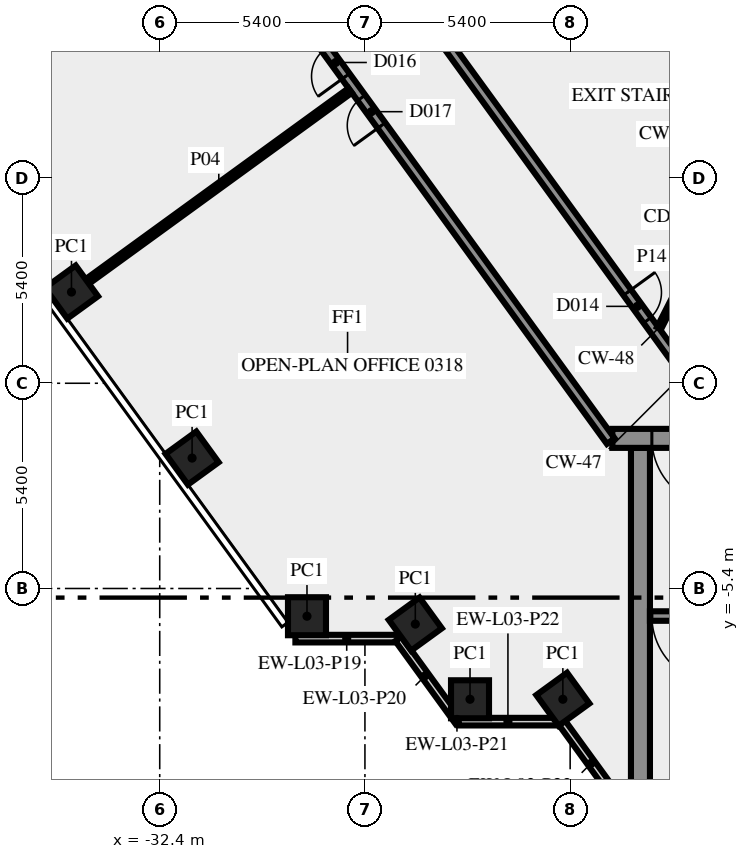
"""IFC4 building model, lengths in metres.
Left out: names, types, materials, properties, quantities, classifications, styles, units other than length and angle.
Written with IfcOpenShell. Run it as: python <this file> out.ifc"""

import sys

from ifc_helpers import new_model, si_unit, direction, frame, frame_2d, origin, origin_2d, place, context, subcontext, project, spatial, rectangle, extrude, element, fill, save


model = new_model("IFC4")
c1 = context("Model", 3, precision=1e-05, world=origin(), true_north=direction((0.0, 1.0)))
c2 = subcontext(c1, "Body", "Model", "MODEL_VIEW")
j1 = project(units=[si_unit("LENGTHUNIT", "METRE"), si_unit("PLANEANGLEUNIT", "RADIAN")], contexts=[c1])
p1 = place(None, origin())
s1 = spatial("IfcSite", under=j1, at=p1, CompositionType="ELEMENT")
p2 = place(p1, origin())
s2 = spatial("IfcBuilding", under=s1, at=p2, CompositionType="ELEMENT")
p3 = place(p2, frame((0.0, 0.0, 16.0)))
s3 = spatial("IfcBuildingStorey", under=s2, at=p3, CompositionType="ELEMENT", Elevation=16.0)
for number, where, z_axis, x_axis in (
    (1, (-34.722, 2.4, 0.0), (0.0, 0.0, 1.0), (0.588, -0.809, 0.0)),
    (2, (-31.548, -1.969, 0.0), (0.0, 0.0, 1.0), (0.588, -0.809, 0.0)),
    (3, (-28.525, -6.13, 0.0), (0.0, 0.0, 1.0), (1.0, 0.0, 0.0)),
    (4, (-25.674, -6.337, 0.0), (0.0, 0.0, 1.0), (0.588, -0.809, 0.0)),
    (5, (-24.235, -8.315, 0.0), (0.0, 0.0, 1.0), (1.0, 0.0, 0.0)),
    (6, (-21.792, -8.315, 0.0), (0.0, 0.0, 1.0), (0.588, -0.809, 0.0)),
):
    element("IfcColumn", number, at=place(p3, frame(where, z_axis=z_axis, x_axis=x_axis)), inside=s3, PredefinedType="COLUMN", context=c2, shape_type="SweptSolid", body=[
        extrude(rectangle(XDim=1.0, YDim=1.0, at=origin_2d()), origin(), (0.0, 0.0, 1.0), 4.1),
    ])
p4 = place(p3, frame((-28.83, -6.719, 0.0), z_axis=(0.0, 0.0, 1.0), x_axis=(1.0, 0.0, 0.0)))
e7 = element("IfcWall", 7, at=p4, inside=s3, PredefinedType="SOLIDWALL", context=c2, shape_type="SweptSolid", body=[
    extrude(rectangle(XDim=2.7, YDim=0.2, at=frame_2d((1.35, 0.0))), origin(), (0.0, 0.0, 1.0), 4.1),
])
p5 = place(p3, frame((-26.12, -6.724, 0.0), z_axis=(0.0, 0.0, 1.0), x_axis=(0.587706476352, -0.809074222587, 0.0)))
e8 = element("IfcWall", 8, at=p5, inside=s3, PredefinedType="SOLIDWALL", context=c2, shape_type="SweptSolid", body=[
    extrude(rectangle(XDim=2.403, YDim=0.2, at=frame_2d((1.202, 0.0))), origin(), (0.0, 0.0, 1.0), 4.1),
])
p6 = place(p3, frame((-24.624, -8.784, 0.0), z_axis=(0.0, 0.0, 1.0), x_axis=(0.586760218966, -0.809760733451, 0.0)))
e9 = element("IfcWall", 9, at=p6, inside=s3, PredefinedType="SOLIDWALL", context=c2, shape_type="SweptSolid", body=[
    extrude(rectangle(XDim=0.154, YDim=0.2, at=frame_2d((0.077, 0.0))), origin(), (0.0, 0.0, 1.0), 4.1),
])
p7 = place(p3, frame((-24.531, -8.904, 0.0), z_axis=(0.0, 0.0, 1.0), x_axis=(1.0, 0.0, 0.0)))
e10 = element("IfcWall", 10, at=p7, inside=s3, PredefinedType="SOLIDWALL", context=c2, shape_type="SweptSolid", body=[
    extrude(rectangle(XDim=2.587, YDim=0.2, at=frame_2d((1.294, 0.0))), origin(), (0.0, 0.0, 1.0), 4.1),
])
p8 = place(p3, frame((-21.833, -8.909, 0.0), z_axis=(0.0, 0.0, 1.0), x_axis=(0.587766567315, -0.809030569476, 0.0)))
e11 = element("IfcWall", 11, at=p8, inside=s3, PredefinedType="SOLIDWALL", context=c2, shape_type="SweptSolid", body=[
    extrude(rectangle(XDim=2.688, YDim=0.2, at=frame_2d((1.344, 0.0))), origin(), (0.0, 0.0, 1.0), 4.1),
])
p9 = place(p3, frame((-19.75, -10.5, 0.0), z_axis=(0.0, 0.0, 1.0), x_axis=(0.0, 1.0, 0.0)))
e12 = element("IfcWall", 12, at=p9, inside=s3, PredefinedType="SHEAR", context=c2, shape_type="SweptSolid", body=[
    extrude(rectangle(XDim=8.8, YDim=0.5, at=frame_2d((4.4, 0.0))), origin(), (0.0, 0.0, 1.0), 4.1),
])
p10 = place(p3, frame((-11.45, -6.125, 0.0), z_axis=(0.0, 0.0, 1.0), x_axis=(-1.0, 0.0, 0.0)))
e13 = element("IfcWall", 13, at=p10, inside=s3, PredefinedType="SHEAR", context=c2, shape_type="SweptSolid", body=[
    extrude(rectangle(XDim=8.05, YDim=0.25, at=frame_2d((4.025, 0.0))), origin(), (0.0, 0.0, 1.0), 4.1),
])
p11 = place(p10, frame((6.2, 0.0, 0.0)))
e14 = element("IfcOpeningElement", 14, at=p11, cuts=e13, PredefinedType="OPENING", context=c2, shape_type="SweptSolid", body=[
    extrude(rectangle(XDim=1.8, YDim=2.1, at=frame_2d((0.9, 1.05))), frame((0.0, 0.135, 0.0), z_axis=(0.0, -1.0, 0.0), x_axis=(1.0, 0.0, 0.0)), (0.0, 0.0, 1.0), 0.27),
])
p12 = place(p3, frame((20.49, -1.45, 0.0), z_axis=(0.0, 0.0, 1.0), x_axis=(-1.0, 0.0, 0.0)))
e15 = element("IfcWall", 15, at=p12, inside=s3, PredefinedType="SHEAR", context=c2, shape_type="SweptSolid", body=[
    extrude(rectangle(XDim=40.98, YDim=0.5, at=frame_2d((20.49, 0.0))), origin(), (0.0, 0.0, 1.0), 4.1),
])
p13 = place(p12, frame((38.14, 0.0, 0.0)))
e16 = element("IfcOpeningElement", 16, at=p13, cuts=e15, PredefinedType="OPENING", context=c2, shape_type="SweptSolid", body=[
    extrude(rectangle(XDim=1.8, YDim=2.1, at=frame_2d((0.9, 1.05))), frame((0.0, 0.26, 0.0), z_axis=(0.0, -1.0, 0.0), x_axis=(1.0, 0.0, 0.0)), (0.0, 0.0, 1.0), 0.52),
])
p14 = place(p12, frame((36.728, 0.0, 0.0)))
e17 = element("IfcOpeningElement", 17, at=p14, cuts=e15, PredefinedType="OPENING", context=c2, shape_type="SweptSolid", body=[
    extrude(rectangle(XDim=0.8, YDim=2.1, at=frame_2d((0.4, 1.05))), frame((0.0, 0.26, 0.0), z_axis=(0.0, -1.0, 0.0), x_axis=(1.0, 0.0, 0.0)), (0.0, 0.0, 1.0), 0.52),
])
p15 = place(p12, frame((35.153, 0.0, 0.0)))
e18 = element("IfcOpeningElement", 18, at=p15, cuts=e15, PredefinedType="OPENING", context=c2, shape_type="SweptSolid", body=[
    extrude(rectangle(XDim=0.8, YDim=2.1, at=frame_2d((0.4, 1.05))), frame((0.0, 0.26, 0.0), z_axis=(0.0, -1.0, 0.0), x_axis=(1.0, 0.0, 0.0)), (0.0, 0.0, 1.0), 0.52),
])
p16 = place(p12, frame((32.94, 0.0, 0.0)))
e19 = element("IfcOpeningElement", 19, at=p16, cuts=e15, PredefinedType="OPENING", context=c2, shape_type="SweptSolid", body=[
    extrude(rectangle(XDim=0.9, YDim=2.1, at=frame_2d((0.45, 1.05))), frame((0.0, 0.26, 0.0), z_axis=(0.0, -1.0, 0.0), x_axis=(1.0, 0.0, 0.0)), (0.0, 0.0, 1.0), 0.52),
])
p17 = place(p12, frame((21.765, 0.0, 0.0)))
e20 = element("IfcOpeningElement", 20, at=p17, cuts=e15, PredefinedType="OPENING", context=c2, shape_type="SweptSolid", body=[
    extrude(rectangle(XDim=2.0, YDim=2.1, at=frame_2d((1.0, 1.05))), frame((0.0, 0.26, 0.0), z_axis=(0.0, -1.0, 0.0), x_axis=(1.0, 0.0, 0.0)), (0.0, 0.0, 1.0), 0.52),
])
p18 = place(p12, frame((7.14, 0.0, 0.0)))
e21 = element("IfcOpeningElement", 21, at=p18, cuts=e15, PredefinedType="OPENING", context=c2, shape_type="SweptSolid", body=[
    extrude(rectangle(XDim=0.9, YDim=2.1, at=frame_2d((0.45, 1.05))), frame((0.0, 0.26, 0.0), z_axis=(0.0, -1.0, 0.0), x_axis=(1.0, 0.0, 0.0)), (0.0, 0.0, 1.0), 0.52),
])
p19 = place(p12, frame((4.19, 0.0, 0.0)))
e22 = element("IfcOpeningElement", 22, at=p19, cuts=e15, PredefinedType="OPENING", context=c2, shape_type="SweptSolid", body=[
    extrude(rectangle(XDim=0.9, YDim=2.1, at=frame_2d((0.45, 1.05))), frame((0.0, 0.26, 0.0), z_axis=(0.0, -1.0, 0.0), x_axis=(1.0, 0.0, 0.0)), (0.0, 0.0, 1.0), 0.52),
])
p20 = place(p12, frame((1.04, 0.0, 0.0)))
e23 = element("IfcOpeningElement", 23, at=p20, cuts=e15, PredefinedType="OPENING", context=c2, shape_type="SweptSolid", body=[
    extrude(rectangle(XDim=1.8, YDim=2.1, at=frame_2d((0.9, 1.05))), frame((0.0, 0.26, 0.0), z_axis=(0.0, -1.0, 0.0), x_axis=(1.0, 0.0, 0.0)), (0.0, 0.0, 1.0), 0.52),
])
p21 = place(p3, frame((-20.531, -1.523, 0.0), z_axis=(0.0, 0.0, 1.0), x_axis=(-0.587784522481, 0.809017524614, 0.0)))
e24 = element("IfcWall", 24, at=p21, inside=s3, PredefinedType="SOLIDWALL", context=c2, shape_type="SweptSolid", body=[
    extrude(rectangle(XDim=49.912, YDim=0.25, at=frame_2d((24.956, 0.0))), origin(), (0.0, 0.0, 1.0), 4.1),
])
p22 = place(p21, frame((10.266, 0.0, 0.0)))
e25 = element("IfcOpeningElement", 25, at=p22, cuts=e24, PredefinedType="OPENING", context=c2, shape_type="SweptSolid", body=[
    extrude(rectangle(XDim=0.9, YDim=2.1, at=frame_2d((0.45, 1.05))), frame((0.0, 0.135, 0.0), z_axis=(0.0, -1.0, 0.0), x_axis=(1.0, 0.0, 0.0)), (0.0, 0.0, 1.0), 0.27),
])
p23 = place(p21, frame((37.193, 0.0, 0.0)))
e26 = element("IfcOpeningElement", 26, at=p23, cuts=e24, PredefinedType="OPENING", context=c2, shape_type="SweptSolid", body=[
    extrude(rectangle(XDim=1.8, YDim=2.1, at=frame_2d((0.9, 1.05))), frame((0.0, 0.135, 0.0), z_axis=(0.0, -1.0, 0.0), x_axis=(1.0, 0.0, 0.0)), (0.0, 0.0, 1.0), 0.27),
])
p24 = place(p21, frame((11.866, 0.0, 0.0)))
e27 = element("IfcOpeningElement", 27, at=p24, cuts=e24, PredefinedType="OPENING", context=c2, shape_type="SweptSolid", body=[
    extrude(rectangle(XDim=0.9, YDim=2.1, at=frame_2d((0.45, 1.05))), frame((0.0, 0.135, 0.0), z_axis=(0.0, -1.0, 0.0), x_axis=(1.0, 0.0, 0.0)), (0.0, 0.0, 1.0), 0.27),
])
p25 = place(p3, frame((-37.232, 25.972, 0.0), z_axis=(0.0, 0.0, 1.0), x_axis=(0.587786323093, -0.809016216391, 0.0)))
e28 = element("IfcWall", 28, at=p25, inside=s3, PredefinedType="SOLIDWALL", context=c2, shape_type="SweptSolid", body=[
    extrude(rectangle(XDim=33.493, YDim=0.25, at=frame_2d((16.747, 0.0))), origin(), (0.0, 0.0, 1.0), 4.1),
])
p26 = place(p25, frame((29.152, 0.0, 0.0)))
e29 = element("IfcOpeningElement", 29, at=p26, cuts=e28, PredefinedType="OPENING", context=c2, shape_type="SweptSolid", body=[
    extrude(rectangle(XDim=0.9, YDim=2.1, at=frame_2d((0.45, 1.05))), frame((0.0, 0.135, 0.0), z_axis=(0.0, -1.0, 0.0), x_axis=(1.0, 0.0, 0.0)), (0.0, 0.0, 1.0), 0.27),
])
p27 = place(p25, frame((5.113, 0.0, 0.0)))
e30 = element("IfcOpeningElement", 30, at=p27, cuts=e28, PredefinedType="OPENING", context=c2, shape_type="SweptSolid", body=[
    extrude(rectangle(XDim=1.8, YDim=2.1, at=frame_2d((0.9, 1.05))), frame((0.0, 0.135, 0.0), z_axis=(0.0, -1.0, 0.0), x_axis=(1.0, 0.0, 0.0)), (0.0, 0.0, 1.0), 0.27),
])
p28 = place(p3, frame((-27.389, 7.703, 0.0), z_axis=(0.0, 0.0, 1.0), x_axis=(-0.809054740315, -0.587733295955, 0.0)))
e31 = element("IfcWall", 31, at=p28, inside=s3, PredefinedType="PARTITIONING", context=c2, shape_type="SweptSolid", body=[
    extrude(rectangle(XDim=8.545, YDim=0.15, at=frame_2d((4.272, 0.0))), origin(), (0.0, 0.0, 1.0), 4.1),
])
p29 = place(p3, frame((-19.261, 1.45, 0.0), z_axis=(0.0, 0.0, 1.0), x_axis=(0.453950796792, 0.891026752736, 0.0)))
e32 = element("IfcWall", 32, at=p29, inside=s3, PredefinedType="PARTITIONING", context=c2, shape_type="SweptSolid", body=[
    extrude(rectangle(XDim=2.778, YDim=0.12, at=frame_2d((1.389, 0.0))), origin(), (0.0, 0.0, 1.0), 4.1),
])
p30 = place(p11, origin())
e33 = element("IfcDoor", 33, at=p30, inside=s3, OperationType="DOUBLE_DOOR_SINGLE_SWING", PredefinedType="DOOR", context=c2, shape_type="SweptSolid", body=[
    extrude(rectangle(XDim=1.8, YDim=2.1, at=frame_2d((0.9, 1.05))), frame((0.0, 0.025, 0.0), z_axis=(0.0, -1.0, 0.0), x_axis=(1.0, 0.0, 0.0)), (0.0, 0.0, 1.0), 0.05),
])
fill(e14, e33)
p31 = place(p13, origin())
e34 = element("IfcDoor", 34, at=p31, inside=s3, OperationType="DOUBLE_DOOR_SINGLE_SWING", PredefinedType="DOOR", context=c2, shape_type="SweptSolid", body=[
    extrude(rectangle(XDim=1.8, YDim=2.1, at=frame_2d((0.9, 1.05))), frame((0.0, 0.025, 0.0), z_axis=(0.0, -1.0, 0.0), x_axis=(1.0, 0.0, 0.0)), (0.0, 0.0, 1.0), 0.05),
])
fill(e16, e34)
p32 = place(p22, origin())
e35 = element("IfcDoor", 35, at=p32, inside=s3, OperationType="SINGLE_SWING_RIGHT", PredefinedType="DOOR", context=c2, shape_type="SweptSolid", body=[
    extrude(rectangle(XDim=0.9, YDim=2.1, at=frame_2d((0.45, 1.05))), frame((0.0, 0.025, 0.0), z_axis=(0.0, -1.0, 0.0), x_axis=(1.0, 0.0, 0.0)), (0.0, 0.0, 1.0), 0.05),
])
fill(e25, e35)
p33 = place(p26, origin())
e36 = element("IfcDoor", 36, at=p33, inside=s3, OperationType="SINGLE_SWING_RIGHT", PredefinedType="DOOR", context=c2, shape_type="SweptSolid", body=[
    extrude(rectangle(XDim=0.9, YDim=2.1, at=frame_2d((0.45, 1.05))), frame((0.0, 0.025, 0.0), z_axis=(0.0, -1.0, 0.0), x_axis=(1.0, 0.0, 0.0)), (0.0, 0.0, 1.0), 0.05),
])
fill(e29, e36)
p34 = place(p24, origin())
e37 = element("IfcDoor", 37, at=p34, inside=s3, OperationType="SINGLE_SWING_LEFT", PredefinedType="DOOR", context=c2, shape_type="SweptSolid", body=[
    extrude(rectangle(XDim=0.9, YDim=2.1, at=frame_2d((0.45, 1.05))), frame((0.0, 0.025, 0.0), z_axis=(0.0, -1.0, 0.0), x_axis=(1.0, 0.0, 0.0)), (0.0, 0.0, 1.0), 0.05),
])
fill(e27, e37)
save(model, sys.argv[1])
